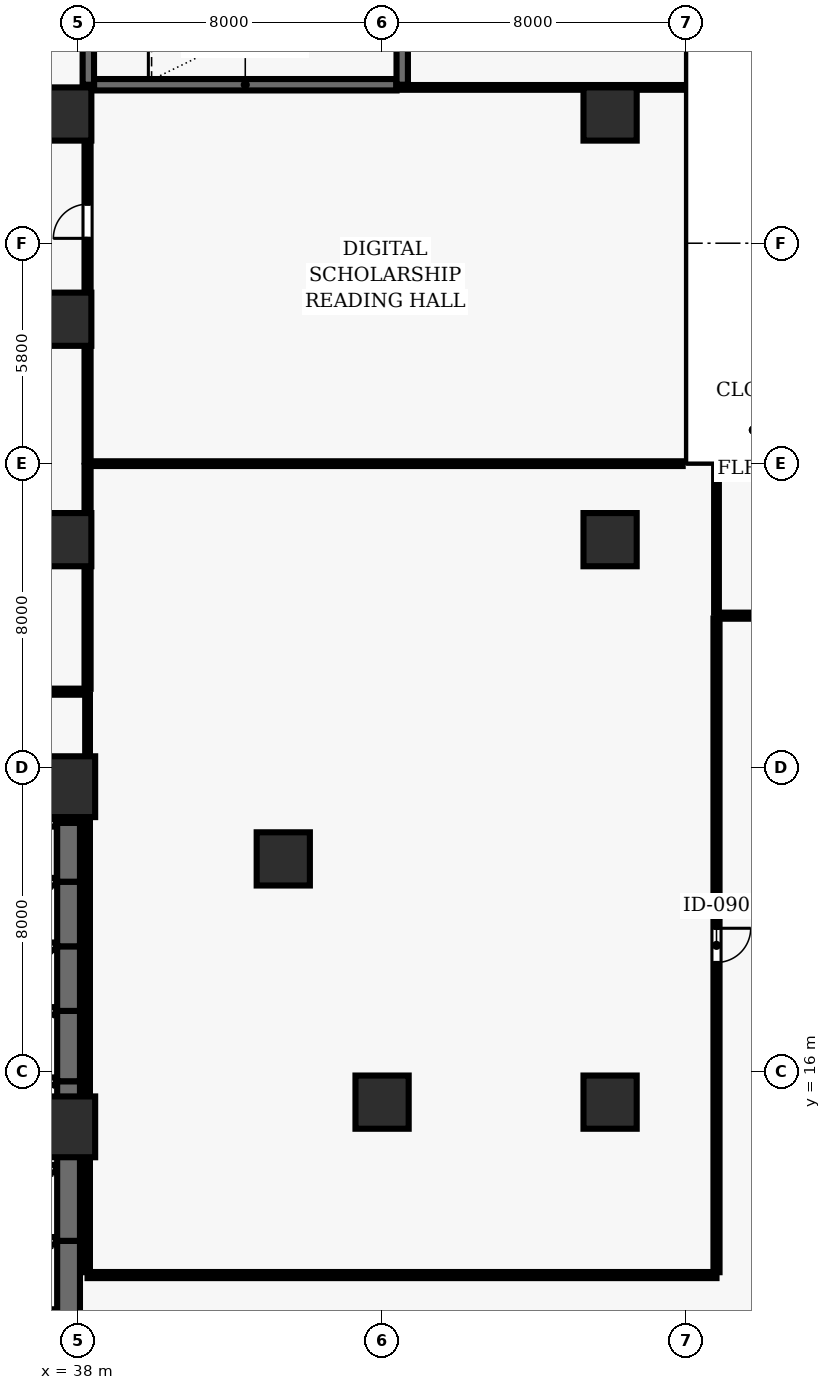
"""IFC4 building model, lengths in metres.
Left out: names, types, materials, properties, quantities, classifications, styles, units other than length and angle.
Written with IfcOpenShell. Run it as: python <this file> out.ifc"""

import sys

from ifc_helpers import new_model, si_unit, direction, frame, frame_2d, origin, origin_2d, place, context, subcontext, project, spatial, rectangle, extrude, element, fill, save


model = new_model("IFC4")
c1 = context("Model", 3, precision=1e-05, world=origin(), true_north=direction((0.0, 1.0)))
c2 = subcontext(c1, "Body", "Model", "MODEL_VIEW")
j1 = project(units=[si_unit("LENGTHUNIT", "METRE"), si_unit("PLANEANGLEUNIT", "RADIAN")], contexts=[c1])
p1 = place(None, origin())
s1 = spatial("IfcSite", under=j1, at=p1, CompositionType="ELEMENT")
p2 = place(p1, origin())
s2 = spatial("IfcBuilding", under=s1, at=p2, CompositionType="ELEMENT")
p3 = place(p2, frame((0.0, 0.0, 20.8)))
s3 = spatial("IfcBuildingStorey", under=s2, at=p3, CompositionType="ELEMENT", Elevation=20.8)
for number, where, z_axis, x_axis in (
    (1, (37.65, 14.55, 0.0), (0.0, 0.0, 1.0), (1.0, 0.0, 0.0)),
    (2, (37.65, 23.5, 0.0), (0.0, 0.0, 1.0), (1.0, 0.0, 0.0)),
):
    element("IfcColumn", number, at=place(p3, frame(where, z_axis=z_axis, x_axis=x_axis)), inside=s3, PredefinedType="COLUMN", context=c2, shape_type="SweptSolid", body=[
        extrude(rectangle(XDim=1.6, YDim=1.6, at=origin_2d()), origin(), (0.0, 0.0, 1.0), 5.2),
    ])
for number, where, z_axis, x_axis in (
    (3, (46.0, 15.2, 0.0), (0.0, 0.0, 1.0), (1.0, 0.0, 0.0)),
    (4, (52.0, 15.2, 0.0), (0.0, 0.0, 1.0), (1.0, 0.0, 0.0)),
    (5, (37.65, 30.0, 0.0), (0.0, 0.0, 1.0), (1.0, 0.0, 0.0)),
    (6, (37.65, 35.8, 0.0), (0.0, 0.0, 1.0), (1.0, 0.0, 0.0)),
    (7, (37.65, 41.2, 0.0), (0.0, 0.0, 1.0), (1.0, 0.0, 0.0)),
    (8, (43.4, 21.6, 0.0), (0.0, 0.0, 1.0), (1.0, 0.0, 0.0)),
    (9, (52.0, 30.0, 0.0), (0.0, 0.0, 1.0), (1.0, 0.0, 0.0)),
    (10, (52.0, 41.2, 0.0), (0.0, 0.0, 1.0), (1.0, 0.0, 0.0)),
):
    element("IfcColumn", number, at=place(p3, frame(where, z_axis=z_axis, x_axis=x_axis)), inside=s3, PredefinedType="COLUMN", context=c2, shape_type="SweptSolid", body=[
        extrude(rectangle(XDim=1.4, YDim=1.4, at=origin_2d()), origin(), (0.0, 0.0, 1.0), 5.2),
    ])
p4 = place(p3, frame((38.42, 41.97, 0.0), z_axis=(0.0, 0.0, 1.0), x_axis=(1.0, 0.0, 0.0)))
e11 = element("IfcWall", 11, at=p4, inside=s3, PredefinedType="SHEAR", context=c2, shape_type="SweptSolid", body=[
    extrude(rectangle(XDim=7.96, YDim=0.3, at=frame_2d((3.98, 0.0))), origin(), (0.0, 0.0, 1.0), 4.78),
])
p5 = place(p3, frame((46.53, 41.97, 0.0), z_axis=(0.0, 0.0, 1.0), x_axis=(0.0, 1.0, 0.0)))
e12 = element("IfcWall", 12, at=p5, inside=s3, PredefinedType="SHEAR", context=c2, shape_type="SweptSolid", body=[
    extrude(rectangle(XDim=3.41, YDim=0.3, at=frame_2d((1.705, 0.0))), origin(), (0.0, 0.0, 1.0), 4.78),
])
p6 = place(p3, frame((38.27, 45.92, 0.0), z_axis=(0.0, 0.0, 1.0), x_axis=(0.0, -1.0, 0.0)))
e13 = element("IfcWall", 13, at=p6, inside=s3, PredefinedType="SHEAR", context=c2, shape_type="SweptSolid", body=[
    extrude(rectangle(XDim=3.95, YDim=0.3, at=frame_2d((1.975, 0.0))), origin(), (0.0, 0.0, 1.0), 4.78),
])
p7 = place(p6, frame((1.67, 0.0, 0.0)))
e14 = element("IfcOpeningElement", 14, at=p7, cuts=e13, PredefinedType="OPENING", context=c2, shape_type="SweptSolid", body=[
    extrude(rectangle(XDim=1.15, YDim=2.15, at=frame_2d((0.575, 1.075))), frame((0.0, 0.16, 0.0), z_axis=(0.0, -1.0, 0.0), x_axis=(1.0, 0.0, 0.0)), (0.0, 0.0, 1.0), 0.32),
])
p8 = place(p3, frame((37.75, 9.65, 0.0), z_axis=(0.0, 0.0, 1.0), x_axis=(0.0, 1.0, 0.0)))
e15 = element("IfcWall", 15, at=p8, inside=s3, PredefinedType="SHEAR", context=c2, shape_type="SweptSolid", body=[
    extrude(rectangle(XDim=1.9, YDim=0.6, at=frame_2d((0.95, 0.0))), origin(), (0.0, 0.0, 1.0), 4.78),
])
for number, where, z_axis, x_axis in (
    (16, (35.28, 9.65, 0.0), (0.0, 0.0, 1.0), (1.0, 0.0, 0.0)),
    (17, (37.42, 11.55, 0.0), (0.0, 0.0, 1.0), (-1.0, 0.0, 0.0)),
):
    element("IfcWall", number, at=place(p3, frame(where, z_axis=z_axis, x_axis=x_axis)), inside=s3, PredefinedType="SOLIDWALL", context=c2, shape_type="SweptSolid", body=[
        extrude(rectangle(XDim=2.14, YDim=0.2, at=frame_2d((1.07, 0.0))), origin(), (0.0, 0.0, 1.0), 4.78),
    ])
p9 = place(p3, frame((37.75, 11.55, 0.0), z_axis=(0.0, 0.0, 1.0), x_axis=(0.0, 1.0, 0.0)))
e18 = element("IfcWall", 18, at=p9, inside=s3, PredefinedType="SHEAR", context=c2, shape_type="SweptSolid", body=[
    extrude(rectangle(XDim=2.35, YDim=0.6, at=frame_2d((1.175, 0.0))), origin(), (0.0, 0.0, 1.0), 4.78),
])
p10 = place(p3, frame((37.42, 13.45, 0.0), z_axis=(0.0, 0.0, 1.0), x_axis=(-1.0, 0.0, 0.0)))
e19 = element("IfcWall", 19, at=p10, inside=s3, PredefinedType="SOLIDWALL", context=c2, shape_type="SweptSolid", body=[
    extrude(rectangle(XDim=2.14, YDim=0.2, at=frame_2d((1.07, 0.0))), origin(), (0.0, 0.0, 1.0), 4.78),
])
p11 = place(p3, frame((37.75, 13.9, 0.0), z_axis=(0.0, 0.0, 1.0), x_axis=(0.0, 1.0, 0.0)))
e20 = element("IfcWall", 20, at=p11, inside=s3, PredefinedType="SHEAR", context=c2, shape_type="SweptSolid", body=[
    extrude(rectangle(XDim=1.85, YDim=0.6, at=frame_2d((0.925, 0.0))), origin(), (0.0, 0.0, 1.0), 4.78),
])
for number, where, z_axis, x_axis in (
    (21, (35.28, 13.9, 0.0), (0.0, 0.0, 1.0), (1.0, 0.0, 0.0)),
    (22, (37.42, 15.75, 0.0), (0.0, 0.0, 1.0), (-1.0, 0.0, 0.0)),
):
    element("IfcWall", number, at=place(p3, frame(where, z_axis=z_axis, x_axis=x_axis)), inside=s3, PredefinedType="SOLIDWALL", context=c2, shape_type="SweptSolid", body=[
        extrude(rectangle(XDim=2.14, YDim=0.2, at=frame_2d((1.07, 0.0))), origin(), (0.0, 0.0, 1.0), 4.78),
    ])
p12 = place(p3, frame((37.75, 15.75, 0.0), z_axis=(0.0, 0.0, 1.0), x_axis=(0.0, 1.0, 0.0)))
e23 = element("IfcWall", 23, at=p12, inside=s3, PredefinedType="SHEAR", context=c2, shape_type="SweptSolid", body=[
    extrude(rectangle(XDim=1.85, YDim=0.6, at=frame_2d((0.925, 0.0))), origin(), (0.0, 0.0, 1.0), 4.78),
])
p13 = place(p3, frame((37.42, 17.6, 0.0), z_axis=(0.0, 0.0, 1.0), x_axis=(-1.0, 0.0, 0.0)))
e24 = element("IfcWall", 24, at=p13, inside=s3, PredefinedType="SOLIDWALL", context=c2, shape_type="SweptSolid", body=[
    extrude(rectangle(XDim=2.14, YDim=0.2, at=frame_2d((1.07, 0.0))), origin(), (0.0, 0.0, 1.0), 4.78),
])
p14 = place(p3, frame((37.75, 17.6, 0.0), z_axis=(0.0, 0.0, 1.0), x_axis=(0.0, 1.0, 0.0)))
e25 = element("IfcWall", 25, at=p14, inside=s3, PredefinedType="SHEAR", context=c2, shape_type="SweptSolid", body=[
    extrude(rectangle(XDim=1.7, YDim=0.6, at=frame_2d((0.85, 0.0))), origin(), (0.0, 0.0, 1.0), 4.78),
])
p15 = place(p3, frame((37.42, 19.3, 0.0), z_axis=(0.0, 0.0, 1.0), x_axis=(-1.0, 0.0, 0.0)))
e26 = element("IfcWall", 26, at=p15, inside=s3, PredefinedType="SOLIDWALL", context=c2, shape_type="SweptSolid", body=[
    extrude(rectangle(XDim=2.14, YDim=0.2, at=frame_2d((1.07, 0.0))), origin(), (0.0, 0.0, 1.0), 4.78),
])
p16 = place(p3, frame((37.75, 19.3, 0.0), z_axis=(0.0, 0.0, 1.0), x_axis=(0.0, 1.0, 0.0)))
e27 = element("IfcWall", 27, at=p16, inside=s3, PredefinedType="SHEAR", context=c2, shape_type="SweptSolid", body=[
    extrude(rectangle(XDim=1.7, YDim=0.6, at=frame_2d((0.85, 0.0))), origin(), (0.0, 0.0, 1.0), 4.78),
])
p17 = place(p3, frame((37.42, 21.0, 0.0), z_axis=(0.0, 0.0, 1.0), x_axis=(-1.0, 0.0, 0.0)))
e28 = element("IfcWall", 28, at=p17, inside=s3, PredefinedType="SOLIDWALL", context=c2, shape_type="SweptSolid", body=[
    extrude(rectangle(XDim=2.14, YDim=0.2, at=frame_2d((1.07, 0.0))), origin(), (0.0, 0.0, 1.0), 4.78),
])
p18 = place(p3, frame((37.75, 21.0, 0.0), z_axis=(0.0, 0.0, 1.0), x_axis=(0.0, 1.0, 0.0)))
e29 = element("IfcWall", 29, at=p18, inside=s3, PredefinedType="SHEAR", context=c2, shape_type="SweptSolid", body=[
    extrude(rectangle(XDim=1.55, YDim=0.6, at=frame_2d((0.775, 0.0))), origin(), (0.0, 0.0, 1.0), 4.78),
])
p19 = place(p3, frame((37.42, 22.55, 0.0), z_axis=(0.0, 0.0, 1.0), x_axis=(-1.0, 0.0, 0.0)))
e30 = element("IfcWall", 30, at=p19, inside=s3, PredefinedType="SOLIDWALL", context=c2, shape_type="SweptSolid", body=[
    extrude(rectangle(XDim=2.14, YDim=0.2, at=frame_2d((1.07, 0.0))), origin(), (0.0, 0.0, 1.0), 4.78),
])
p20 = place(p3, frame((37.75, 22.55, 0.0), z_axis=(0.0, 0.0, 1.0), x_axis=(0.0, 1.0, 0.0)))
e31 = element("IfcWall", 31, at=p20, inside=s3, PredefinedType="SHEAR", context=c2, shape_type="SweptSolid", body=[
    extrude(rectangle(XDim=1.5, YDim=0.6, at=frame_2d((0.75, 0.0))), origin(), (0.0, 0.0, 1.0), 4.78),
])
p21 = place(p3, frame((37.42, 24.05, 0.0), z_axis=(0.0, 0.0, 1.0), x_axis=(-1.0, 0.0, 0.0)))
e32 = element("IfcWall", 32, at=p21, inside=s3, PredefinedType="SOLIDWALL", context=c2, shape_type="SweptSolid", body=[
    extrude(rectangle(XDim=2.14, YDim=0.2, at=frame_2d((1.07, 0.0))), origin(), (0.0, 0.0, 1.0), 4.78),
])
p22 = place(p3, frame((35.15, 26.0, 0.0), z_axis=(0.0, 0.0, 1.0), x_axis=(1.0, 0.0, 0.0)))
e33 = element("IfcWall", 33, at=p22, inside=s3, PredefinedType="PARTITIONING", context=c2, shape_type="SweptSolid", body=[
    extrude(rectangle(XDim=3.1, YDim=0.16, at=frame_2d((1.55, 0.0))), origin(), (0.0, 0.0, 1.0), 4.78),
])
p23 = place(p3, frame((38.25, 32.0, 0.0), z_axis=(0.0, 0.0, 1.0), x_axis=(1.0, 0.0, 0.0)))
e34 = element("IfcWall", 34, at=p23, inside=s3, PredefinedType="PARTITIONING", context=c2, shape_type="SweptSolid", body=[
    extrude(rectangle(XDim=15.66, YDim=0.125, at=frame_2d((7.83, 0.0))), origin(), (0.0, 0.0, 1.0), 4.78),
])
p24 = place(p3, frame((53.91, 41.9, 0.0), z_axis=(0.0, 0.0, 1.0), x_axis=(-1.0, 0.0, 0.0)))
e35 = element("IfcWall", 35, at=p24, inside=s3, PredefinedType="PARTITIONING", context=c2, shape_type="SweptSolid", body=[
    extrude(rectangle(XDim=7.53, YDim=0.125, at=frame_2d((3.765, 0.0))), origin(), (0.0, 0.0, 1.0), 4.78),
])
p25 = place(p3, frame((54.8, 10.65, 0.0), z_axis=(0.0, 0.0, 1.0), x_axis=(-1.0, 0.0, 0.0)))
e36 = element("IfcWall", 36, at=p25, inside=s3, PredefinedType="PARTITIONING", context=c2, shape_type="SweptSolid", body=[
    extrude(rectangle(XDim=16.55, YDim=0.16, at=frame_2d((8.275, 0.0))), origin(), (0.0, 0.0, 1.0), 4.229),
])
p26 = place(p3, frame((58.45, 28.0, 0.0), z_axis=(0.0, 0.0, 1.0), x_axis=(-1.0, 0.0, 0.0)))
e37 = element("IfcWall", 37, at=p26, inside=s3, PredefinedType="PARTITIONING", context=c2, shape_type="SweptSolid", body=[
    extrude(rectangle(XDim=3.65, YDim=0.16, at=frame_2d((1.825, 0.0))), origin(), (0.0, 0.0, 1.0), 4.78),
])
p27 = place(p3, frame((38.25, 25.925, 0.0), z_axis=(0.0, 0.0, 1.0), x_axis=(0.0, -1.0, 0.0)))
e38 = element("IfcWall", 38, at=p27, inside=s3, PredefinedType="PARTITIONING", context=c2, shape_type="SweptSolid", body=[
    extrude(rectangle(XDim=15.2, YDim=0.125, at=frame_2d((7.6, 0.0))), origin(), (0.0, 0.0, 1.0), 4.78),
])
p28 = place(p3, frame((38.25, 26.075, 0.0), z_axis=(0.0, 0.0, 1.0), x_axis=(0.0, 1.0, 0.0)))
e39 = element("IfcWall", 39, at=p28, inside=s3, PredefinedType="PARTITIONING", context=c2, shape_type="SweptSolid", body=[
    extrude(rectangle(XDim=5.867, YDim=0.16, at=frame_2d((2.934, 0.0))), origin(), (0.0, 0.0, 1.0), 4.78),
])
p29 = place(p3, frame((38.25, 32.057, 0.0), z_axis=(0.0, 0.0, 1.0), x_axis=(0.0, 1.0, 0.0)))
e40 = element("IfcWall", 40, at=p29, inside=s3, PredefinedType="PARTITIONING", context=c2, shape_type="SweptSolid", body=[
    extrude(rectangle(XDim=9.843, YDim=0.16, at=frame_2d((4.921, 0.0))), origin(), (0.0, 0.0, 1.0), 4.78),
])
p30 = place(p29, frame((5.871, 0.0, 0.0)))
e41 = element("IfcOpeningElement", 41, at=p30, cuts=e40, PredefinedType="OPENING", context=c2, shape_type="SweptSolid", body=[
    extrude(rectangle(XDim=0.9, YDim=2.1, at=frame_2d((0.45, 1.05))), frame((0.0, 0.09, 0.0), z_axis=(0.0, -1.0, 0.0), x_axis=(1.0, 0.0, 0.0)), (0.0, 0.0, 1.0), 0.18),
])
p31 = place(p3, frame((54.8, 28.075, 0.0), z_axis=(0.0, 0.0, 1.0), x_axis=(0.0, 1.0, 0.0)))
e42 = element("IfcWall", 42, at=p31, inside=s3, PredefinedType="PARTITIONING", context=c2, shape_type="SweptSolid", body=[
    extrude(rectangle(XDim=3.835, YDim=0.125, at=frame_2d((1.917, 0.0))), origin(), (0.0, 0.0, 1.0), 4.229),
])
p32 = place(p3, frame((54.8, 27.925, 0.0), z_axis=(0.0, 0.0, 1.0), x_axis=(0.0, -1.0, 0.0)))
e43 = element("IfcWall", 43, at=p32, inside=s3, PredefinedType="PARTITIONING", context=c2, shape_type="SweptSolid", body=[
    extrude(rectangle(XDim=17.2, YDim=0.16, at=frame_2d((8.6, 0.0))), origin(), (0.0, 0.0, 1.0), 4.229),
])
p33 = place(p32, frame((8.15, 0.0, 0.0)))
e44 = element("IfcOpeningElement", 44, at=p33, cuts=e43, PredefinedType="OPENING", context=c2, shape_type="SweptSolid", body=[
    extrude(rectangle(XDim=0.9, YDim=2.1, at=frame_2d((0.45, 1.05))), frame((0.0, 0.09, 0.0), z_axis=(0.0, -1.0, 0.0), x_axis=(1.0, 0.0, 0.0)), (0.0, 0.0, 1.0), 0.18),
])
p34 = place(p33, origin())
e45 = element("IfcDoor", 45, at=p34, inside=s3, OperationType="SINGLE_SWING_LEFT", PredefinedType="DOOR", context=c2, shape_type="SweptSolid", body=[
    extrude(rectangle(XDim=0.9, YDim=2.1, at=frame_2d((0.45, 1.05))), frame((0.0, 0.025, 0.0), z_axis=(0.0, -1.0, 0.0), x_axis=(1.0, 0.0, 0.0)), (0.0, 0.0, 1.0), 0.05),
])
fill(e44, e45)
p35 = place(p30, origin())
e46 = element("IfcDoor", 46, at=p35, inside=s3, OperationType="SINGLE_SWING_LEFT", PredefinedType="DOOR", context=c2, shape_type="SweptSolid", body=[
    extrude(rectangle(XDim=0.9, YDim=2.1, at=frame_2d((0.45, 1.05))), frame((0.0, 0.025, 0.0), z_axis=(0.0, -1.0, 0.0), x_axis=(1.0, 0.0, 0.0)), (0.0, 0.0, 1.0), 0.05),
])
fill(e41, e46)
save(model, sys.argv[1])
